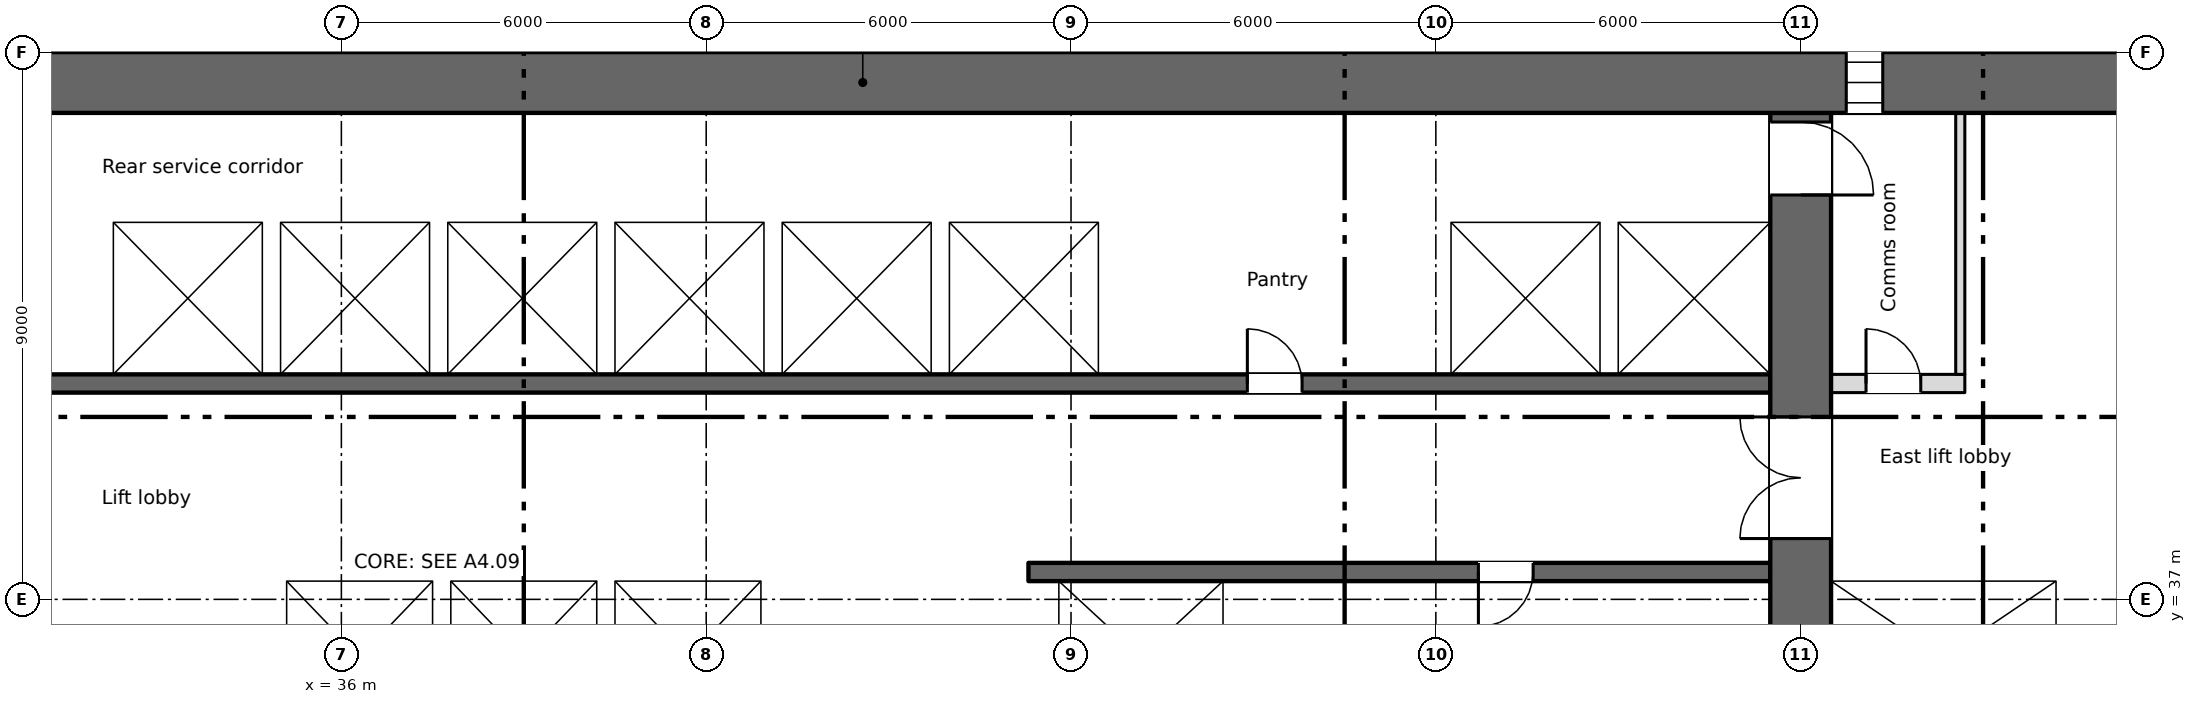
"""IFC4 building model, lengths in metres.
Left out: names, types, materials, properties, quantities, classifications, styles, units other than length and angle.
Written with IfcOpenShell. Run it as: python <this file> out.ifc"""

import sys

from ifc_helpers import new_model, si_unit, direction, frame, frame_2d, origin, place, context, subcontext, project, spatial, rectangle, extrude, element, fill, save


model = new_model("IFC4")
c1 = context("Model", 3, precision=1e-05, world=origin(), true_north=direction((0.0, 1.0)))
c2 = subcontext(c1, "Body", "Model", "MODEL_VIEW")
j1 = project(units=[si_unit("LENGTHUNIT", "METRE"), si_unit("PLANEANGLEUNIT", "RADIAN")], contexts=[c1])
p1 = place(None, origin())
s1 = spatial("IfcSite", under=j1, at=p1, CompositionType="ELEMENT")
p2 = place(p1, origin())
s2 = spatial("IfcBuilding", under=s1, at=p2, CompositionType="ELEMENT")
p3 = place(p2, frame((0.0, 0.0, 41.25)))
s3 = spatial("IfcBuildingStorey", under=s2, at=p3, CompositionType="ELEMENT", Elevation=41.25)
p4 = place(p3, frame((5.55, 45.5, 0.0), z_axis=(0.0, 0.0, 1.0), x_axis=(1.0, 0.0, 0.0)))
e1 = element("IfcWall", 1, at=p4, inside=s3, PredefinedType="SHEAR", context=c2, shape_type="SweptSolid", body=[
    extrude(rectangle(XDim=66.9, YDim=1.0, at=frame_2d((33.45, 0.0))), origin(), (0.0, 0.0, 1.0), 3.35),
])
p5 = place(p4, frame((1.2, 0.0, 0.6)))
e2 = element("IfcOpeningElement", 2, at=p5, cuts=e1, PredefinedType="OPENING", context=c2, shape_type="SweptSolid", body=[
    extrude(rectangle(XDim=0.6, YDim=2.4, at=frame_2d((0.3, 1.2))), frame((0.0, 0.51, 0.0), z_axis=(0.0, -1.0, 0.0), x_axis=(1.0, 0.0, 0.0)), (0.0, 0.0, 1.0), 1.02),
])
p6 = place(p4, frame((7.2, 0.0, 0.6)))
e3 = element("IfcOpeningElement", 3, at=p6, cuts=e1, PredefinedType="OPENING", context=c2, shape_type="SweptSolid", body=[
    extrude(rectangle(XDim=0.6, YDim=2.4, at=frame_2d((0.3, 1.2))), frame((0.0, 0.51, 0.0), z_axis=(0.0, -1.0, 0.0), x_axis=(1.0, 0.0, 0.0)), (0.0, 0.0, 1.0), 1.02),
])
p7 = place(p4, frame((55.2, 0.0, 0.6)))
e4 = element("IfcOpeningElement", 4, at=p7, cuts=e1, PredefinedType="OPENING", context=c2, shape_type="SweptSolid", body=[
    extrude(rectangle(XDim=0.6, YDim=2.4, at=frame_2d((0.3, 1.2))), frame((0.0, 0.51, 0.0), z_axis=(0.0, -1.0, 0.0), x_axis=(1.0, 0.0, 0.0)), (0.0, 0.0, 1.0), 1.02),
])
p8 = place(p4, frame((61.2, 0.0, 0.6)))
e5 = element("IfcOpeningElement", 5, at=p8, cuts=e1, PredefinedType="OPENING", context=c2, shape_type="SweptSolid", body=[
    extrude(rectangle(XDim=0.6, YDim=2.4, at=frame_2d((0.3, 1.2))), frame((0.0, 0.51, 0.0), z_axis=(0.0, -1.0, 0.0), x_axis=(1.0, 0.0, 0.0)), (0.0, 0.0, 1.0), 1.02),
])
p9 = place(p3, frame((64.35, 34.8, 0.0), z_axis=(0.0, 0.0, 1.0), x_axis=(0.0, 1.0, 0.0)))
e6 = element("IfcWall", 6, at=p9, inside=s3, PredefinedType="SHEAR", context=c2, shape_type="SweptSolid", body=[
    extrude(rectangle(XDim=10.2, YDim=0.3, at=frame_2d((5.1, 0.0))), origin(), (0.0, 0.0, 1.0), 3.35),
])
p10 = place(p3, frame((60.0, 28.4, 0.0), z_axis=(0.0, 0.0, 1.0), x_axis=(0.0, 1.0, 0.0)))
e7 = element("IfcWall", 7, at=p10, inside=s3, PredefinedType="SHEAR", context=c2, shape_type="SweptSolid", body=[
    extrude(rectangle(XDim=16.6, YDim=1.0, at=frame_2d((8.3, 0.0))), origin(), (0.0, 0.0, 1.0), 3.35),
])
p11 = place(p10, frame((9.6, 0.0, 0.0)))
e8 = element("IfcOpeningElement", 8, at=p11, cuts=e7, PredefinedType="OPENING", context=c2, shape_type="SweptSolid", body=[
    extrude(rectangle(XDim=2.0, YDim=2.1, at=frame_2d((1.0, 1.05))), frame((0.0, 0.51, 0.0), z_axis=(0.0, -1.0, 0.0), x_axis=(1.0, 0.0, 0.0)), (0.0, 0.0, 1.0), 1.02),
])
p12 = place(p10, frame((15.25, 0.0, 0.0)))
e9 = element("IfcOpeningElement", 9, at=p12, cuts=e7, PredefinedType="OPENING", context=c2, shape_type="SweptSolid", body=[
    extrude(rectangle(XDim=1.2, YDim=2.1, at=frame_2d((0.6, 1.05))), frame((0.0, 0.51, 0.0), z_axis=(0.0, -1.0, 0.0), x_axis=(1.0, 0.0, 0.0)), (0.0, 0.0, 1.0), 1.02),
])
p13 = place(p3, frame((34.8, 37.45, 0.0), z_axis=(0.0, 0.0, 1.0), x_axis=(1.0, 0.0, 0.0)))
e10 = element("IfcWall", 10, at=p13, inside=s3, PredefinedType="SHEAR", context=c2, shape_type="SweptSolid", body=[
    extrude(rectangle(XDim=8.4, YDim=0.3, at=frame_2d((4.2, 0.0))), origin(), (0.0, 0.0, 1.0), 3.35),
])
p14 = place(p13, frame((0.95, 0.0, 0.0)))
e11 = element("IfcOpeningElement", 11, at=p14, cuts=e10, PredefinedType="OPENING", context=c2, shape_type="SweptSolid", body=[
    extrude(rectangle(XDim=1.1, YDim=2.1, at=frame_2d((0.55, 1.05))), frame((0.0, 0.16, 0.0), z_axis=(0.0, -1.0, 0.0), x_axis=(1.0, 0.0, 0.0)), (0.0, 0.0, 1.0), 0.32),
])
p15 = place(p13, frame((3.65, 0.0, 0.0)))
e12 = element("IfcOpeningElement", 12, at=p15, cuts=e10, PredefinedType="OPENING", context=c2, shape_type="SweptSolid", body=[
    extrude(rectangle(XDim=1.1, YDim=2.1, at=frame_2d((0.55, 1.05))), frame((0.0, 0.16, 0.0), z_axis=(0.0, -1.0, 0.0), x_axis=(1.0, 0.0, 0.0)), (0.0, 0.0, 1.0), 0.32),
])
p16 = place(p13, frame((6.35, 0.0, 0.0)))
e13 = element("IfcOpeningElement", 13, at=p16, cuts=e10, PredefinedType="OPENING", context=c2, shape_type="SweptSolid", body=[
    extrude(rectangle(XDim=1.1, YDim=2.1, at=frame_2d((0.55, 1.05))), frame((0.0, 0.16, 0.0), z_axis=(0.0, -1.0, 0.0), x_axis=(1.0, 0.0, 0.0)), (0.0, 0.0, 1.0), 0.32),
])
p17 = place(p3, frame((59.5, 37.45, 0.0), z_axis=(0.0, 0.0, 1.0), x_axis=(-1.0, 0.0, 0.0)))
e14 = element("IfcWall", 14, at=p17, inside=s3, PredefinedType="SHEAR", context=c2, shape_type="SweptSolid", body=[
    extrude(rectangle(XDim=12.2, YDim=0.3, at=frame_2d((6.1, 0.0))), origin(), (0.0, 0.0, 1.0), 3.35),
])
p18 = place(p17, frame((3.9, 0.0, 0.0)))
e15 = element("IfcOpeningElement", 15, at=p18, cuts=e14, PredefinedType="OPENING", context=c2, shape_type="SweptSolid", body=[
    extrude(rectangle(XDim=0.9, YDim=2.1, at=frame_2d((0.45, 1.05))), frame((0.0, 0.16, 0.0), z_axis=(0.0, -1.0, 0.0), x_axis=(1.0, 0.0, 0.0)), (0.0, 0.0, 1.0), 0.32),
])
p19 = place(p3, frame((60.5, 37.45, 0.0), z_axis=(0.0, 0.0, 1.0), x_axis=(1.0, 0.0, 0.0)))
e16 = element("IfcWall", 16, at=p19, inside=s3, PredefinedType="SHEAR", context=c2, shape_type="SweptSolid", body=[
    extrude(rectangle(XDim=3.7, YDim=0.3, at=frame_2d((1.85, 0.0))), origin(), (0.0, 0.0, 1.0), 3.35),
])
p20 = place(p19, frame((1.3, 0.0, 0.0)))
e17 = element("IfcOpeningElement", 17, at=p20, cuts=e16, PredefinedType="OPENING", context=c2, shape_type="SweptSolid", body=[
    extrude(rectangle(XDim=1.1, YDim=2.1, at=frame_2d((0.55, 1.05))), frame((0.0, 0.16, 0.0), z_axis=(0.0, -1.0, 0.0), x_axis=(1.0, 0.0, 0.0)), (0.0, 0.0, 1.0), 0.32),
])
for number, where, z_axis, x_axis in (
    (18, (34.95, 34.8, 0.0), (0.0, 0.0, 1.0), (0.0, 1.0, 0.0)),
    (19, (43.05, 34.8, 0.0), (0.0, 0.0, 1.0), (0.0, 1.0, 0.0)),
):
    element("IfcWall", number, at=place(p3, frame(where, z_axis=z_axis, x_axis=x_axis)), inside=s3, PredefinedType="SHEAR", context=c2, shape_type="SweptSolid", body=[
        extrude(rectangle(XDim=2.5, YDim=0.3, at=frame_2d((1.25, 0.0))), origin(), (0.0, 0.0, 1.0), 3.35),
    ])
p21 = place(p3, frame((47.55, 34.8, 0.0), z_axis=(0.0, 0.0, 1.0), x_axis=(0.0, 1.0, 0.0)))
e20 = element("IfcWall", 20, at=p21, inside=s3, PredefinedType="SHEAR", context=c2, shape_type="SweptSolid", body=[
    extrude(rectangle(XDim=2.5, YDim=0.5, at=frame_2d((1.25, 0.0))), origin(), (0.0, 0.0, 1.0), 3.35),
])
p22 = place(p3, frame((50.65, 34.8, 0.0), z_axis=(0.0, 0.0, 1.0), x_axis=(0.0, 1.0, 0.0)))
e21 = element("IfcWall", 21, at=p22, inside=s3, PredefinedType="SHEAR", context=c2, shape_type="SweptSolid", body=[
    extrude(rectangle(XDim=2.5, YDim=0.3, at=frame_2d((1.25, 0.0))), origin(), (0.0, 0.0, 1.0), 3.35),
])
p23 = place(p3, frame((18.5, 40.55, 0.0), z_axis=(0.0, 0.0, 1.0), x_axis=(1.0, 0.0, 0.0)))
e22 = element("IfcWall", 22, at=p23, inside=s3, PredefinedType="SHEAR", context=c2, shape_type="SweptSolid", body=[
    extrude(rectangle(XDim=41.0, YDim=0.3, at=frame_2d((20.5, 0.0))), origin(), (0.0, 0.0, 1.0), 3.35),
])
p24 = place(p23, frame((9.025, 0.0, 0.0)))
e23 = element("IfcOpeningElement", 23, at=p24, cuts=e22, PredefinedType="OPENING", context=c2, shape_type="SweptSolid", body=[
    extrude(rectangle(XDim=0.9, YDim=2.1, at=frame_2d((0.45, 1.05))), frame((0.0, 0.16, 0.0), z_axis=(0.0, -1.0, 0.0), x_axis=(1.0, 0.0, 0.0)), (0.0, 0.0, 1.0), 0.32),
])
p25 = place(p23, frame((32.4, 0.0, 0.0)))
e24 = element("IfcOpeningElement", 24, at=p25, cuts=e22, PredefinedType="OPENING", context=c2, shape_type="SweptSolid", body=[
    extrude(rectangle(XDim=0.9, YDim=2.1, at=frame_2d((0.45, 1.05))), frame((0.0, 0.16, 0.0), z_axis=(0.0, -1.0, 0.0), x_axis=(1.0, 0.0, 0.0)), (0.0, 0.0, 1.0), 0.32),
])
p26 = place(p23, frame((14.425, 0.0, 0.0)))
e25 = element("IfcOpeningElement", 25, at=p26, cuts=e22, PredefinedType="OPENING", context=c2, shape_type="SweptSolid", body=[
    extrude(rectangle(XDim=1.1, YDim=2.1, at=frame_2d((0.55, 1.05))), frame((0.0, 0.16, 0.0), z_axis=(0.0, -1.0, 0.0), x_axis=(1.0, 0.0, 0.0)), (0.0, 0.0, 1.0), 0.32),
])
p27 = place(p23, frame((17.175, 0.0, 0.0)))
e26 = element("IfcOpeningElement", 26, at=p27, cuts=e22, PredefinedType="OPENING", context=c2, shape_type="SweptSolid", body=[
    extrude(rectangle(XDim=1.1, YDim=2.1, at=frame_2d((0.55, 1.05))), frame((0.0, 0.16, 0.0), z_axis=(0.0, -1.0, 0.0), x_axis=(1.0, 0.0, 0.0)), (0.0, 0.0, 1.0), 0.32),
])
p28 = place(p23, frame((19.925, 0.0, 0.0)))
e27 = element("IfcOpeningElement", 27, at=p28, cuts=e22, PredefinedType="OPENING", context=c2, shape_type="SweptSolid", body=[
    extrude(rectangle(XDim=1.1, YDim=2.1, at=frame_2d((0.55, 1.05))), frame((0.0, 0.16, 0.0), z_axis=(0.0, -1.0, 0.0), x_axis=(1.0, 0.0, 0.0)), (0.0, 0.0, 1.0), 0.32),
])
p29 = place(p23, frame((22.675, 0.0, 0.0)))
e28 = element("IfcOpeningElement", 28, at=p29, cuts=e22, PredefinedType="OPENING", context=c2, shape_type="SweptSolid", body=[
    extrude(rectangle(XDim=1.1, YDim=2.1, at=frame_2d((0.55, 1.05))), frame((0.0, 0.16, 0.0), z_axis=(0.0, -1.0, 0.0), x_axis=(1.0, 0.0, 0.0)), (0.0, 0.0, 1.0), 0.32),
])
p30 = place(p23, frame((36.375, 0.0, 0.0)))
e29 = element("IfcOpeningElement", 29, at=p30, cuts=e22, PredefinedType="OPENING", context=c2, shape_type="SweptSolid", body=[
    extrude(rectangle(XDim=1.2, YDim=2.1, at=frame_2d((0.6, 1.05))), frame((0.0, 0.16, 0.0), z_axis=(0.0, -1.0, 0.0), x_axis=(1.0, 0.0, 0.0)), (0.0, 0.0, 1.0), 0.32),
])
p31 = place(p23, frame((39.15, 0.0, 0.0)))
e30 = element("IfcOpeningElement", 30, at=p31, cuts=e22, PredefinedType="OPENING", context=c2, shape_type="SweptSolid", body=[
    extrude(rectangle(XDim=1.2, YDim=2.1, at=frame_2d((0.6, 1.05))), frame((0.0, 0.16, 0.0), z_axis=(0.0, -1.0, 0.0), x_axis=(1.0, 0.0, 0.0)), (0.0, 0.0, 1.0), 0.32),
])
p32 = place(p3, frame((18.5, 43.35, 0.0), z_axis=(0.0, 0.0, 1.0), x_axis=(1.0, 0.0, 0.0)))
e31 = element("IfcWall", 31, at=p32, inside=s3, PredefinedType="SHEAR", context=c2, shape_type="SweptSolid", body=[
    extrude(rectangle(XDim=41.0, YDim=0.3, at=frame_2d((20.5, 0.0))), origin(), (0.0, 0.0, 1.0), 3.35),
])
p33 = place(p3, frame((60.5, 40.55, 0.0), z_axis=(0.0, 0.0, 1.0), x_axis=(1.0, 0.0, 0.0)))
e32 = element("IfcWall", 32, at=p33, inside=s3, PredefinedType="PARTITIONING", context=c2, shape_type="SweptSolid", body=[
    extrude(rectangle(XDim=2.2, YDim=0.3, at=frame_2d((1.1, 0.0))), origin(), (0.0, 0.0, 1.0), 3.35),
])
p34 = place(p33, frame((0.575, 0.0, 0.0)))
e33 = element("IfcOpeningElement", 33, at=p34, cuts=e32, PredefinedType="OPENING", context=c2, shape_type="SweptSolid", body=[
    extrude(rectangle(XDim=0.9, YDim=2.1, at=frame_2d((0.45, 1.05))), frame((0.0, 0.16, 0.0), z_axis=(0.0, -1.0, 0.0), x_axis=(1.0, 0.0, 0.0)), (0.0, 0.0, 1.0), 0.32),
])
for number, where, z_axis, x_axis in (
    (34, (37.65, 34.8, 0.0), (0.0, 0.0, 1.0), (0.0, 1.0, 0.0)),
    (35, (40.35, 34.8, 0.0), (0.0, 0.0, 1.0), (0.0, 1.0, 0.0)),
    (36, (32.1, 40.7, 0.0), (0.0, 0.0, 1.0), (0.0, 1.0, 0.0)),
    (37, (34.85, 40.7, 0.0), (0.0, 0.0, 1.0), (0.0, 1.0, 0.0)),
    (38, (37.6, 40.7, 0.0), (0.0, 0.0, 1.0), (0.0, 1.0, 0.0)),
    (39, (40.35, 40.7, 0.0), (0.0, 0.0, 1.0), (0.0, 1.0, 0.0)),
    (40, (43.1, 40.7, 0.0), (0.0, 0.0, 1.0), (0.0, 1.0, 0.0)),
    (41, (45.85, 40.7, 0.0), (0.0, 0.0, 1.0), (0.0, 1.0, 0.0)),
    (42, (48.6, 40.7, 0.0), (0.0, 0.0, 1.0), (0.0, 1.0, 0.0)),
    (43, (54.1, 40.7, 0.0), (0.0, 0.0, 1.0), (0.0, 1.0, 0.0)),
    (44, (56.85, 40.7, 0.0), (0.0, 0.0, 1.0), (0.0, 1.0, 0.0)),
):
    element("IfcWall", number, at=place(p3, frame(where, z_axis=z_axis, x_axis=x_axis)), inside=s3, PredefinedType="SHEAR", context=c2, shape_type="SweptSolid", body=[
        extrude(rectangle(XDim=2.5, YDim=0.3, at=frame_2d((1.25, 0.0))), origin(), (0.0, 0.0, 1.0), 3.35),
    ])
p35 = place(p3, frame((62.625, 40.7, 0.0), z_axis=(0.0, 0.0, 1.0), x_axis=(0.0, 1.0, 0.0)))
e45 = element("IfcWall", 45, at=p35, inside=s3, PredefinedType="PARTITIONING", context=c2, shape_type="SweptSolid", body=[
    extrude(rectangle(XDim=4.3, YDim=0.15, at=frame_2d((2.15, 0.0))), origin(), (0.0, 0.0, 1.0), 3.35),
])
p36 = place(p7, origin())
e46 = element("IfcWindow", 46, at=p36, inside=s3, PartitioningType="SINGLE_PANEL", PredefinedType="WINDOW", context=c2, shape_type="SweptSolid", body=[
    extrude(rectangle(XDim=0.6, YDim=2.4, at=frame_2d((0.3, 1.2))), frame((0.0, 0.03, 0.0), z_axis=(0.0, -1.0, 0.0), x_axis=(1.0, 0.0, 0.0)), (0.0, 0.0, 1.0), 0.06),
])
fill(e4, e46)
p37 = place(p34, origin())
e47 = element("IfcDoor", 47, at=p37, inside=s3, OperationType="SINGLE_SWING_LEFT", PredefinedType="DOOR", context=c2, shape_type="SweptSolid", body=[
    extrude(rectangle(XDim=0.9, YDim=2.1, at=frame_2d((0.45, 1.05))), frame((0.0, 0.025, 0.0), z_axis=(0.0, -1.0, 0.0), x_axis=(1.0, 0.0, 0.0)), (0.0, 0.0, 1.0), 0.05),
])
fill(e33, e47)
p38 = place(p18, origin())
e48 = element("IfcDoor", 48, at=p38, inside=s3, OperationType="SINGLE_SWING_RIGHT", PredefinedType="DOOR", context=c2, shape_type="SweptSolid", body=[
    extrude(rectangle(XDim=0.9, YDim=2.1, at=frame_2d((0.45, 1.05))), frame((0.0, 0.025, 0.0), z_axis=(0.0, -1.0, 0.0), x_axis=(1.0, 0.0, 0.0)), (0.0, 0.0, 1.0), 0.05),
])
fill(e15, e48)
p39 = place(p25, origin())
e49 = element("IfcDoor", 49, at=p39, inside=s3, OperationType="SINGLE_SWING_LEFT", PredefinedType="DOOR", context=c2, shape_type="SweptSolid", body=[
    extrude(rectangle(XDim=0.9, YDim=2.1, at=frame_2d((0.45, 1.05))), frame((0.0, 0.025, 0.0), z_axis=(0.0, -1.0, 0.0), x_axis=(1.0, 0.0, 0.0)), (0.0, 0.0, 1.0), 0.05),
])
fill(e24, e49)
p40 = place(p14, origin())
e50 = element("IfcDoor", 50, at=p40, inside=s3, OperationType="SLIDING_TO_LEFT", PredefinedType="DOOR", context=c2, shape_type="SweptSolid", body=[
    extrude(rectangle(XDim=1.1, YDim=2.1, at=frame_2d((0.55, 1.05))), frame((0.0, 0.025, 0.0), z_axis=(0.0, -1.0, 0.0), x_axis=(1.0, 0.0, 0.0)), (0.0, 0.0, 1.0), 0.05),
])
fill(e11, e50)
p41 = place(p15, origin())
e51 = element("IfcDoor", 51, at=p41, inside=s3, OperationType="SLIDING_TO_LEFT", PredefinedType="DOOR", context=c2, shape_type="SweptSolid", body=[
    extrude(rectangle(XDim=1.1, YDim=2.1, at=frame_2d((0.55, 1.05))), frame((0.0, 0.025, 0.0), z_axis=(0.0, -1.0, 0.0), x_axis=(1.0, 0.0, 0.0)), (0.0, 0.0, 1.0), 0.05),
])
fill(e12, e51)
p42 = place(p16, origin())
e52 = element("IfcDoor", 52, at=p42, inside=s3, OperationType="SLIDING_TO_LEFT", PredefinedType="DOOR", context=c2, shape_type="SweptSolid", body=[
    extrude(rectangle(XDim=1.1, YDim=2.1, at=frame_2d((0.55, 1.05))), frame((0.0, 0.025, 0.0), z_axis=(0.0, -1.0, 0.0), x_axis=(1.0, 0.0, 0.0)), (0.0, 0.0, 1.0), 0.05),
])
fill(e13, e52)
p43 = place(p26, origin())
e53 = element("IfcDoor", 53, at=p43, inside=s3, OperationType="SLIDING_TO_LEFT", PredefinedType="DOOR", context=c2, shape_type="SweptSolid", body=[
    extrude(rectangle(XDim=1.1, YDim=2.1, at=frame_2d((0.55, 1.05))), frame((0.0, 0.025, 0.0), z_axis=(0.0, -1.0, 0.0), x_axis=(1.0, 0.0, 0.0)), (0.0, 0.0, 1.0), 0.05),
])
fill(e25, e53)
p44 = place(p27, origin())
e54 = element("IfcDoor", 54, at=p44, inside=s3, OperationType="SLIDING_TO_LEFT", PredefinedType="DOOR", context=c2, shape_type="SweptSolid", body=[
    extrude(rectangle(XDim=1.1, YDim=2.1, at=frame_2d((0.55, 1.05))), frame((0.0, 0.025, 0.0), z_axis=(0.0, -1.0, 0.0), x_axis=(1.0, 0.0, 0.0)), (0.0, 0.0, 1.0), 0.05),
])
fill(e26, e54)
p45 = place(p28, origin())
e55 = element("IfcDoor", 55, at=p45, inside=s3, OperationType="SLIDING_TO_LEFT", PredefinedType="DOOR", context=c2, shape_type="SweptSolid", body=[
    extrude(rectangle(XDim=1.1, YDim=2.1, at=frame_2d((0.55, 1.05))), frame((0.0, 0.025, 0.0), z_axis=(0.0, -1.0, 0.0), x_axis=(1.0, 0.0, 0.0)), (0.0, 0.0, 1.0), 0.05),
])
fill(e27, e55)
p46 = place(p29, origin())
e56 = element("IfcDoor", 56, at=p46, inside=s3, OperationType="SLIDING_TO_LEFT", PredefinedType="DOOR", context=c2, shape_type="SweptSolid", body=[
    extrude(rectangle(XDim=1.1, YDim=2.1, at=frame_2d((0.55, 1.05))), frame((0.0, 0.025, 0.0), z_axis=(0.0, -1.0, 0.0), x_axis=(1.0, 0.0, 0.0)), (0.0, 0.0, 1.0), 0.05),
])
fill(e28, e56)
p47 = place(p30, origin())
e57 = element("IfcDoor", 57, at=p47, inside=s3, OperationType="SLIDING_TO_LEFT", PredefinedType="DOOR", context=c2, shape_type="SweptSolid", body=[
    extrude(rectangle(XDim=1.2, YDim=2.1, at=frame_2d((0.6, 1.05))), frame((0.0, 0.025, 0.0), z_axis=(0.0, -1.0, 0.0), x_axis=(1.0, 0.0, 0.0)), (0.0, 0.0, 1.0), 0.05),
])
fill(e29, e57)
p48 = place(p31, origin())
e58 = element("IfcDoor", 58, at=p48, inside=s3, OperationType="SLIDING_TO_LEFT", PredefinedType="DOOR", context=c2, shape_type="SweptSolid", body=[
    extrude(rectangle(XDim=1.2, YDim=2.1, at=frame_2d((0.6, 1.05))), frame((0.0, 0.025, 0.0), z_axis=(0.0, -1.0, 0.0), x_axis=(1.0, 0.0, 0.0)), (0.0, 0.0, 1.0), 0.05),
])
fill(e30, e58)
p49 = place(p20, origin())
e59 = element("IfcDoor", 59, at=p49, inside=s3, OperationType="SLIDING_TO_LEFT", PredefinedType="DOOR", context=c2, shape_type="SweptSolid", body=[
    extrude(rectangle(XDim=1.1, YDim=2.1, at=frame_2d((0.55, 1.05))), frame((0.0, 0.025, 0.0), z_axis=(0.0, -1.0, 0.0), x_axis=(1.0, 0.0, 0.0)), (0.0, 0.0, 1.0), 0.05),
])
fill(e17, e59)
p50 = place(p11, origin())
e60 = element("IfcDoor", 60, at=p50, inside=s3, OperationType="DOUBLE_DOOR_SINGLE_SWING", PredefinedType="DOOR", context=c2, shape_type="SweptSolid", body=[
    extrude(rectangle(XDim=2.0, YDim=2.1, at=frame_2d((1.0, 1.05))), frame((0.0, 0.025, 0.0), z_axis=(0.0, -1.0, 0.0), x_axis=(1.0, 0.0, 0.0)), (0.0, 0.0, 1.0), 0.05),
])
fill(e8, e60)
p51 = place(p12, origin())
e61 = element("IfcDoor", 61, at=p51, inside=s3, OperationType="SINGLE_SWING_LEFT", PredefinedType="DOOR", context=c2, shape_type="SweptSolid", body=[
    extrude(rectangle(XDim=1.2, YDim=2.1, at=frame_2d((0.6, 1.05))), frame((0.0, 0.025, 0.0), z_axis=(0.0, -1.0, 0.0), x_axis=(1.0, 0.0, 0.0)), (0.0, 0.0, 1.0), 0.05),
])
fill(e9, e61)
save(model, sys.argv[1])
